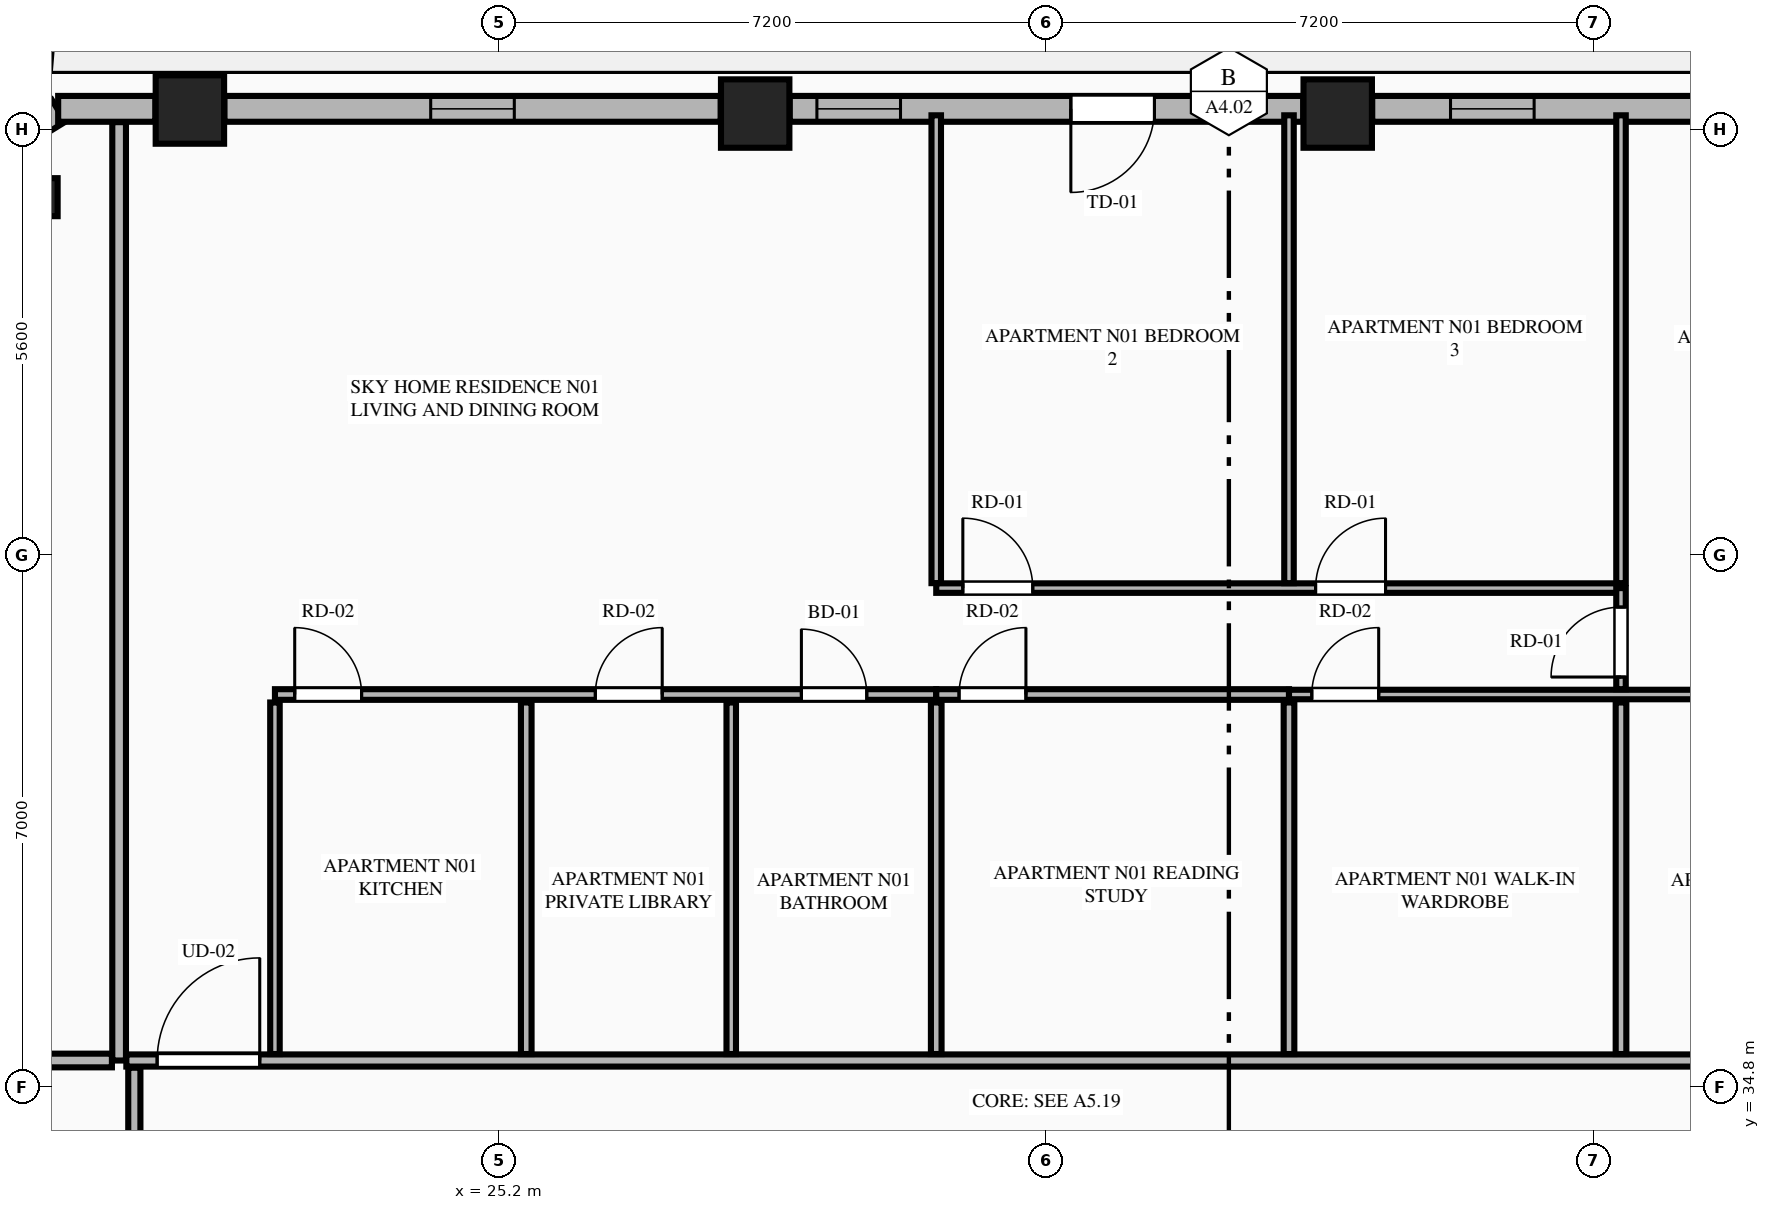
"""IFC4 building model, lengths in metres.
Left out: names, types, materials, properties, quantities, classifications, styles, units other than length and angle.
Written with IfcOpenShell. Run it as: python <this file> out.ifc"""

import sys

from ifc_helpers import new_model, si_unit, direction, frame, frame_2d, origin, origin_2d, place, context, subcontext, project, spatial, rectangle, extrude, element, fill, save


model = new_model("IFC4")
c1 = context("Model", 3, precision=1e-05, world=origin(), true_north=direction((0.0, 1.0)))
c2 = subcontext(c1, "Body", "Model", "MODEL_VIEW")
j1 = project(units=[si_unit("LENGTHUNIT", "METRE"), si_unit("PLANEANGLEUNIT", "RADIAN")], contexts=[c1])
p1 = place(None, origin())
s1 = spatial("IfcSite", under=j1, at=p1, CompositionType="ELEMENT")
p2 = place(p1, origin())
s2 = spatial("IfcBuilding", under=s1, at=p2, CompositionType="ELEMENT")
p3 = place(p2, frame((0.0, 0.0, 153.5)))
s3 = spatial("IfcBuildingStorey", under=s2, at=p3, CompositionType="ELEMENT", Elevation=153.5)
for number, where, z_axis, x_axis in (
    (1, (36.232, 47.608, 0.0), (0.0, 0.0, 1.0), (1.0, 0.0, 0.0)),
    (2, (28.568, 47.608, 0.0), (0.0, 0.0, 1.0), (1.0, 0.0, 0.0)),
    (3, (21.131, 47.661, 0.0), (0.0, 0.0, 1.0), (1.0, 0.0, 0.0)),
):
    element("IfcColumn", number, at=place(p3, frame(where, z_axis=z_axis, x_axis=x_axis)), inside=s3, PredefinedType="COLUMN", context=c2, shape_type="SweptSolid", body=[
        extrude(rectangle(XDim=0.9, YDim=0.9, at=origin_2d()), origin(), (0.0, 0.0, 1.0), 3.55),
    ])
p4 = place(p3, frame((19.141, 46.508, 0.0), z_axis=(0.0, 0.0, 1.0), x_axis=(-0.865160173452, -0.501495637342, 0.0)))
e4 = element("IfcColumn", 4, at=p4, inside=s3, PredefinedType="PILASTER", context=c2, shape_type="SweptSolid", body=[
    extrude(rectangle(XDim=0.5, YDim=0.35, at=origin_2d()), origin(), (0.0, 0.0, 1.0), 3.55),
])
p5 = place(p3, frame((19.403, 47.645, 0.0), z_axis=(0.0, 0.0, 1.0), x_axis=(-0.851798915137, -0.523868884523, 0.0)))
e5 = element("IfcWall", 5, at=p5, inside=s3, PredefinedType="STANDARD", context=c2, shape_type="SweptSolid", body=[
    extrude(rectangle(XDim=1.848, YDim=0.34, at=frame_2d((0.924, 0.0))), origin(), (0.0, 0.0, 1.0), 3.34),
])
p6 = place(p3, frame((43.215, 47.67, 0.0), z_axis=(0.0, 0.0, 1.0), x_axis=(-1.0, 0.0, 0.0)))
e6 = element("IfcWall", 6, at=p6, inside=s3, PredefinedType="STANDARD", context=c2, shape_type="SweptSolid", body=[
    extrude(rectangle(XDim=6.529, YDim=0.34, at=frame_2d((3.265, 0.0))), origin(), (0.0, 0.0, 1.0), 2.797),
])
p7 = place(p6, frame((1.022, 0.0, 0.75)))
e7 = element("IfcOpeningElement", 7, at=p7, cuts=e6, PredefinedType="OPENING", context=c2, shape_type="SweptSolid", body=[
    extrude(rectangle(XDim=1.1, YDim=1.897, at=frame_2d((0.55, 0.948))), frame((0.0, 0.18, 0.0), z_axis=(0.0, -1.0, 0.0), x_axis=(1.0, 0.0, 0.0)), (0.0, 0.0, 1.0), 0.36),
])
p8 = place(p6, frame((4.399, 0.0, 0.75)))
e8 = element("IfcOpeningElement", 8, at=p8, cuts=e6, PredefinedType="OPENING", context=c2, shape_type="SweptSolid", body=[
    extrude(rectangle(XDim=1.1, YDim=1.897, at=frame_2d((0.55, 0.948))), frame((0.0, 0.18, 0.0), z_axis=(0.0, -1.0, 0.0), x_axis=(1.0, 0.0, 0.0)), (0.0, 0.0, 1.0), 0.36),
])
p9 = place(p3, frame((35.778, 47.67, 0.0), z_axis=(0.0, 0.0, 1.0), x_axis=(-1.0, 0.0, 0.0)))
e9 = element("IfcWall", 9, at=p9, inside=s3, PredefinedType="STANDARD", context=c2, shape_type="SweptSolid", body=[
    extrude(rectangle(XDim=6.756, YDim=0.34, at=frame_2d((3.378, 0.0))), origin(), (0.0, 0.0, 1.0), 2.797),
])
p10 = place(p9, frame((1.957, 0.0, 0.0)))
e10 = element("IfcOpeningElement", 10, at=p10, cuts=e9, PredefinedType="OPENING", context=c2, shape_type="SweptSolid", body=[
    extrude(rectangle(XDim=1.1, YDim=2.25, at=frame_2d((0.55, 1.125))), frame((0.0, 0.18, 0.0), z_axis=(0.0, -1.0, 0.0), x_axis=(1.0, 0.0, 0.0)), (0.0, 0.0, 1.0), 0.36),
])
p11 = place(p9, frame((5.298, 0.0, 0.75)))
e11 = element("IfcOpeningElement", 11, at=p11, cuts=e9, PredefinedType="OPENING", context=c2, shape_type="SweptSolid", body=[
    extrude(rectangle(XDim=1.1, YDim=1.897, at=frame_2d((0.55, 0.948))), frame((0.0, 0.18, 0.0), z_axis=(0.0, -1.0, 0.0), x_axis=(1.0, 0.0, 0.0)), (0.0, 0.0, 1.0), 0.36),
])
p12 = place(p3, frame((28.114, 47.67, 0.0), z_axis=(0.0, 0.0, 1.0), x_axis=(-1.0, 0.0, 0.0)))
e12 = element("IfcWall", 12, at=p12, inside=s3, PredefinedType="STANDARD", context=c2, shape_type="SweptSolid", body=[
    extrude(rectangle(XDim=6.529, YDim=0.34, at=frame_2d((3.265, 0.0))), origin(), (0.0, 0.0, 1.0), 2.797),
])
p13 = place(p12, frame((2.715, 0.0, 0.75)))
e13 = element("IfcOpeningElement", 13, at=p13, cuts=e12, PredefinedType="OPENING", context=c2, shape_type="SweptSolid", body=[
    extrude(rectangle(XDim=1.1, YDim=1.897, at=frame_2d((0.55, 0.948))), frame((0.0, 0.18, 0.0), z_axis=(0.0, -1.0, 0.0), x_axis=(1.0, 0.0, 0.0)), (0.0, 0.0, 1.0), 0.36),
])
p14 = place(p3, frame((20.677, 47.67, 0.0), z_axis=(0.0, 0.0, 1.0), x_axis=(-1.0, 0.0, 0.0)))
e14 = element("IfcWall", 14, at=p14, inside=s3, PredefinedType="STANDARD", context=c2, shape_type="SweptSolid", body=[
    extrude(rectangle(XDim=1.279, YDim=0.34, at=frame_2d((0.64, 0.0))), origin(), (0.0, 0.0, 1.0), 3.34),
])
p15 = place(p3, frame((20.2, 35.15, 0.0), z_axis=(0.0, 0.0, 1.0), x_axis=(0.0, 1.0, 0.0)))
e15 = element("IfcWall", 15, at=p15, inside=s3, PredefinedType="PARTITIONING", context=c2, shape_type="SweptSolid", body=[
    extrude(rectangle(XDim=12.345, YDim=0.18, at=frame_2d((6.173, 0.0))), origin(), (0.0, 0.0, 1.0), 3.34),
])
p16 = place(p3, frame((20.295, 35.15, 0.0), z_axis=(0.0, 0.0, 1.0), x_axis=(1.0, 0.0, 0.0)))
e16 = element("IfcWall", 16, at=p16, inside=s3, PredefinedType="PARTITIONING", context=c2, shape_type="SweptSolid", body=[
    extrude(rectangle(XDim=24.21, YDim=0.16, at=frame_2d((12.105, 0.0))), origin(), (0.0, 0.0, 1.0), 3.34),
])
p17 = place(p16, frame((0.405, 0.0, 0.0)))
e17 = element("IfcOpeningElement", 17, at=p17, cuts=e16, PredefinedType="OPENING", context=c2, shape_type="SweptSolid", body=[
    extrude(rectangle(XDim=1.35, YDim=2.35, at=frame_2d((0.675, 1.175))), frame((0.0, 0.09, 0.0), z_axis=(0.0, -1.0, 0.0), x_axis=(1.0, 0.0, 0.0)), (0.0, 0.0, 1.0), 0.18),
])
p18 = place(p3, frame((22.25, 35.235, 0.0), z_axis=(0.0, 0.0, 1.0), x_axis=(0.0, 1.0, 0.0)))
e18 = element("IfcWall", 18, at=p18, inside=s3, PredefinedType="PARTITIONING", context=c2, shape_type="SweptSolid", body=[
    extrude(rectangle(XDim=4.625, YDim=0.125, at=frame_2d((2.312, 0.0))), origin(), (0.0, 0.0, 1.0), 2.722),
])
p19 = place(p3, frame((22.25, 39.965, 0.0), z_axis=(0.0, 0.0, 1.0), x_axis=(1.0, 0.0, 0.0)))
e19 = element("IfcWall", 19, at=p19, inside=s3, PredefinedType="PLUMBINGWALL", context=c2, shape_type="SweptSolid", body=[
    extrude(rectangle(XDim=8.7, YDim=0.14, at=frame_2d((4.35, 0.0))), origin(), (0.0, 0.0, 1.0), 3.34),
])
p20 = place(p19, frame((6.926, 0.0, 0.0)))
e20 = element("IfcOpeningElement", 20, at=p20, cuts=e19, PredefinedType="OPENING", context=c2, shape_type="SweptSolid", body=[
    extrude(rectangle(XDim=0.86, YDim=2.1, at=frame_2d((0.43, 1.05))), frame((0.0, 0.08, 0.0), z_axis=(0.0, -1.0, 0.0), x_axis=(1.0, 0.0, 0.0)), (0.0, 0.0, 1.0), 0.16),
])
p21 = place(p19, frame((0.26, 0.0, 0.0)))
e21 = element("IfcOpeningElement", 21, at=p21, cuts=e19, PredefinedType="OPENING", context=c2, shape_type="SweptSolid", body=[
    extrude(rectangle(XDim=0.88, YDim=2.15, at=frame_2d((0.44, 1.075))), frame((0.0, 0.08, 0.0), z_axis=(0.0, -1.0, 0.0), x_axis=(1.0, 0.0, 0.0)), (0.0, 0.0, 1.0), 0.16),
])
p22 = place(p19, frame((4.215, 0.0, 0.0)))
e22 = element("IfcOpeningElement", 22, at=p22, cuts=e19, PredefinedType="OPENING", context=c2, shape_type="SweptSolid", body=[
    extrude(rectangle(XDim=0.88, YDim=2.15, at=frame_2d((0.44, 1.075))), frame((0.0, 0.08, 0.0), z_axis=(0.0, -1.0, 0.0), x_axis=(1.0, 0.0, 0.0)), (0.0, 0.0, 1.0), 0.16),
])
p23 = place(p3, frame((30.95, 39.965, 0.0), z_axis=(0.0, 0.0, 1.0), x_axis=(1.0, 0.0, 0.0)))
e23 = element("IfcWall", 23, at=p23, inside=s3, PredefinedType="PLUMBINGWALL", context=c2, shape_type="SweptSolid", body=[
    extrude(rectangle(XDim=4.641, YDim=0.14, at=frame_2d((2.321, 0.0))), origin(), (0.0, 0.0, 1.0), 3.34),
])
p24 = place(p23, frame((0.3, 0.0, 0.0)))
e24 = element("IfcOpeningElement", 24, at=p24, cuts=e23, PredefinedType="OPENING", context=c2, shape_type="SweptSolid", body=[
    extrude(rectangle(XDim=0.88, YDim=2.15, at=frame_2d((0.44, 1.075))), frame((0.0, 0.08, 0.0), z_axis=(0.0, -1.0, 0.0), x_axis=(1.0, 0.0, 0.0)), (0.0, 0.0, 1.0), 0.16),
])
p25 = place(p3, frame((35.591, 39.965, 0.0), z_axis=(0.0, 0.0, 1.0), x_axis=(1.0, 0.0, 0.0)))
e25 = element("IfcWall", 25, at=p25, inside=s3, PredefinedType="PARTITIONING", context=c2, shape_type="SweptSolid", body=[
    extrude(rectangle(XDim=8.914, YDim=0.125, at=frame_2d((4.457, 0.0))), origin(), (0.0, 0.0, 1.0), 3.34),
])
p26 = place(p25, frame((6.216, 0.0, 0.0)))
e26 = element("IfcOpeningElement", 26, at=p26, cuts=e25, PredefinedType="OPENING", context=c2, shape_type="SweptSolid", body=[
    extrude(rectangle(XDim=0.86, YDim=2.1, at=frame_2d((0.43, 1.05))), frame((0.0, 0.073, 0.0), z_axis=(0.0, -1.0, 0.0), x_axis=(1.0, 0.0, 0.0)), (0.0, 0.0, 1.0), 0.145),
])
p27 = place(p25, frame((0.3, 0.0, 0.0)))
e27 = element("IfcOpeningElement", 27, at=p27, cuts=e25, PredefinedType="OPENING", context=c2, shape_type="SweptSolid", body=[
    extrude(rectangle(XDim=0.88, YDim=2.15, at=frame_2d((0.44, 1.075))), frame((0.0, 0.073, 0.0), z_axis=(0.0, -1.0, 0.0), x_axis=(1.0, 0.0, 0.0)), (0.0, 0.0, 1.0), 0.145),
])
p28 = place(p3, frame((25.556, 35.235, 0.0), z_axis=(0.0, 0.0, 1.0), x_axis=(0.0, 1.0, 0.0)))
e28 = element("IfcWall", 28, at=p28, inside=s3, PredefinedType="PLUMBINGWALL", context=c2, shape_type="SweptSolid", body=[
    extrude(rectangle(XDim=4.625, YDim=0.14, at=frame_2d((2.312, 0.0))), origin(), (0.0, 0.0, 1.0), 3.34),
])
p29 = place(p3, frame((28.253, 35.235, 0.0), z_axis=(0.0, 0.0, 1.0), x_axis=(0.0, 1.0, 0.0)))
e29 = element("IfcWall", 29, at=p29, inside=s3, PredefinedType="PARTITIONING", context=c2, shape_type="SweptSolid", body=[
    extrude(rectangle(XDim=4.625, YDim=0.125, at=frame_2d((2.312, 0.0))), origin(), (0.0, 0.0, 1.0), 3.34),
])
p30 = place(p3, frame((30.95, 41.43, 0.0), z_axis=(0.0, 0.0, 1.0), x_axis=(0.0, 1.0, 0.0)))
e30 = element("IfcWall", 30, at=p30, inside=s3, PredefinedType="PARTITIONING", context=c2, shape_type="SweptSolid", body=[
    extrude(rectangle(XDim=6.155, YDim=0.125, at=frame_2d((3.078, 0.0))), origin(), (0.0, 0.0, 1.0), 3.34),
])
p31 = place(p3, frame((30.95, 41.365, 0.0), z_axis=(0.0, 0.0, 1.0), x_axis=(1.0, 0.0, 0.0)))
e31 = element("IfcWall", 31, at=p31, inside=s3, PredefinedType="PARTITIONING", context=c2, shape_type="SweptSolid", body=[
    extrude(rectangle(XDim=9.009, YDim=0.125, at=frame_2d((4.504, 0.0))), origin(), (0.0, 0.0, 1.0), 3.34),
])
p32 = place(p31, frame((0.35, 0.0, 0.0)))
e32 = element("IfcOpeningElement", 32, at=p32, cuts=e31, PredefinedType="OPENING", context=c2, shape_type="SweptSolid", body=[
    extrude(rectangle(XDim=0.92, YDim=2.15, at=frame_2d((0.46, 1.075))), frame((0.0, 0.073, 0.0), z_axis=(0.0, -1.0, 0.0), x_axis=(1.0, 0.0, 0.0)), (0.0, 0.0, 1.0), 0.145),
])
p33 = place(p31, frame((4.991, 0.0, 0.0)))
e33 = element("IfcOpeningElement", 33, at=p33, cuts=e31, PredefinedType="OPENING", context=c2, shape_type="SweptSolid", body=[
    extrude(rectangle(XDim=0.92, YDim=2.15, at=frame_2d((0.46, 1.075))), frame((0.0, 0.073, 0.0), z_axis=(0.0, -1.0, 0.0), x_axis=(1.0, 0.0, 0.0)), (0.0, 0.0, 1.0), 0.145),
])
p34 = place(p3, frame((39.959, 40.035, 0.0), z_axis=(0.0, 0.0, 1.0), x_axis=(0.0, 1.0, 0.0)))
e34 = element("IfcWall", 34, at=p34, inside=s3, PredefinedType="PARTITIONING", context=c2, shape_type="SweptSolid", body=[
    extrude(rectangle(XDim=1.33, YDim=0.125, at=frame_2d((0.665, 0.0))), origin(), (0.0, 0.0, 1.0), 3.34),
])
p35 = place(p34, frame((0.16, 0.0, 0.0)))
e35 = element("IfcOpeningElement", 35, at=p35, cuts=e34, PredefinedType="OPENING", context=c2, shape_type="SweptSolid", body=[
    extrude(rectangle(XDim=0.92, YDim=2.15, at=frame_2d((0.46, 1.075))), frame((0.0, 0.073, 0.0), z_axis=(0.0, -1.0, 0.0), x_axis=(1.0, 0.0, 0.0)), (0.0, 0.0, 1.0), 0.145),
])
for number, where, z_axis, x_axis in (
    (36, (30.95, 35.235, 0.0), (0.0, 0.0, 1.0), (0.0, 1.0, 0.0)),
    (37, (35.591, 35.235, 0.0), (0.0, 0.0, 1.0), (0.0, 1.0, 0.0)),
):
    element("IfcWall", number, at=place(p3, frame(where, z_axis=z_axis, x_axis=x_axis)), inside=s3, PredefinedType="PLUMBINGWALL", context=c2, shape_type="SweptSolid", body=[
        extrude(rectangle(XDim=4.625, YDim=0.14, at=frame_2d((2.312, 0.0))), origin(), (0.0, 0.0, 1.0), 3.34),
    ])
for number, where, z_axis, x_axis in (
    (38, (35.591, 41.43, 0.0), (0.0, 0.0, 1.0), (0.0, 1.0, 0.0)),
    (39, (39.959, 41.43, 0.0), (0.0, 0.0, 1.0), (0.0, 1.0, 0.0)),
):
    element("IfcWall", number, at=place(p3, frame(where, z_axis=z_axis, x_axis=x_axis)), inside=s3, PredefinedType="PARTITIONING", context=c2, shape_type="SweptSolid", body=[
        extrude(rectangle(XDim=6.155, YDim=0.125, at=frame_2d((3.078, 0.0))), origin(), (0.0, 0.0, 1.0), 3.34),
    ])
p36 = place(p3, frame((39.959, 35.235, 0.0), z_axis=(0.0, 0.0, 1.0), x_axis=(0.0, 1.0, 0.0)))
e40 = element("IfcWall", 40, at=p36, inside=s3, PredefinedType="PLUMBINGWALL", context=c2, shape_type="SweptSolid", body=[
    extrude(rectangle(XDim=4.625, YDim=0.14, at=frame_2d((2.312, 0.0))), origin(), (0.0, 0.0, 1.0), 3.34),
])
p37 = place(p3, frame((12.21, 35.15, 0.0), z_axis=(0.0, 0.0, 1.0), x_axis=(1.0, 0.0, 0.0)))
e41 = element("IfcWall", 41, at=p37, inside=s3, PredefinedType="PARTITIONING", context=c2, shape_type="SweptSolid", body=[
    extrude(rectangle(XDim=7.895, YDim=0.18, at=frame_2d((3.948, 0.0))), origin(), (0.0, 0.0, 1.0), 3.34),
])
p38 = place(p3, frame((20.4, 16.745, 0.0), z_axis=(0.0, 0.0, 1.0), x_axis=(0.0, 1.0, 0.0)))
e42 = element("IfcWall", 42, at=p38, inside=s3, PredefinedType="PARTITIONING", context=c2, shape_type="SweptSolid", body=[
    extrude(rectangle(XDim=18.31, YDim=0.16, at=frame_2d((9.155, 0.0))), origin(), (0.0, 0.0, 1.0), 3.34),
])
p39 = place(p38, frame((0.45, 0.0, 0.0)))
e43 = element("IfcOpeningElement", 43, at=p39, cuts=e42, PredefinedType="OPENING", context=c2, shape_type="SweptSolid", body=[
    extrude(rectangle(XDim=1.02, YDim=2.25, at=frame_2d((0.51, 1.125))), frame((0.0, 0.09, 0.0), z_axis=(0.0, -1.0, 0.0), x_axis=(1.0, 0.0, 0.0)), (0.0, 0.0, 1.0), 0.18),
])
p40 = place(p10, origin())
e44 = element("IfcDoor", 44, at=p40, inside=s3, OperationType="SINGLE_SWING_RIGHT", PredefinedType="DOOR", context=c2, shape_type="SweptSolid", body=[
    extrude(rectangle(XDim=1.1, YDim=2.25, at=frame_2d((0.55, 1.125))), frame((0.0, 0.025, 0.0), z_axis=(0.0, -1.0, 0.0), x_axis=(1.0, 0.0, 0.0)), (0.0, 0.0, 1.0), 0.05),
])
fill(e10, e44)
p41 = place(p13, origin())
e45 = element("IfcWindow", 45, at=p41, inside=s3, PartitioningType="SINGLE_PANEL", PredefinedType="WINDOW", context=c2, shape_type="SweptSolid", body=[
    extrude(rectangle(XDim=1.1, YDim=1.897, at=frame_2d((0.55, 0.948))), frame((0.0, 0.03, 0.0), z_axis=(0.0, -1.0, 0.0), x_axis=(1.0, 0.0, 0.0)), (0.0, 0.0, 1.0), 0.06),
])
fill(e13, e45)
p42 = place(p20, origin())
e46 = element("IfcDoor", 46, at=p42, inside=s3, OperationType="SINGLE_SWING_LEFT", PredefinedType="DOOR", context=c2, shape_type="SweptSolid", body=[
    extrude(rectangle(XDim=0.86, YDim=2.1, at=frame_2d((0.43, 1.05))), frame((0.0, 0.025, 0.0), z_axis=(0.0, -1.0, 0.0), x_axis=(1.0, 0.0, 0.0)), (0.0, 0.0, 1.0), 0.05),
])
fill(e20, e46)
p43 = place(p17, origin())
e47 = element("IfcDoor", 47, at=p43, inside=s3, OperationType="SINGLE_SWING_RIGHT", PredefinedType="DOOR", context=c2, shape_type="SweptSolid", body=[
    extrude(rectangle(XDim=1.35, YDim=2.35, at=frame_2d((0.675, 1.175))), frame((0.0, 0.025, 0.0), z_axis=(0.0, -1.0, 0.0), x_axis=(1.0, 0.0, 0.0)), (0.0, 0.0, 1.0), 0.05),
])
fill(e17, e47)
p44 = place(p21, origin())
e48 = element("IfcDoor", 48, at=p44, inside=s3, OperationType="SINGLE_SWING_LEFT", PredefinedType="DOOR", context=c2, shape_type="SweptSolid", body=[
    extrude(rectangle(XDim=0.88, YDim=2.15, at=frame_2d((0.44, 1.075))), frame((0.0, 0.025, 0.0), z_axis=(0.0, -1.0, 0.0), x_axis=(1.0, 0.0, 0.0)), (0.0, 0.0, 1.0), 0.05),
])
fill(e21, e48)
p45 = place(p22, origin())
e49 = element("IfcDoor", 49, at=p45, inside=s3, OperationType="SINGLE_SWING_RIGHT", PredefinedType="DOOR", context=c2, shape_type="SweptSolid", body=[
    extrude(rectangle(XDim=0.88, YDim=2.15, at=frame_2d((0.44, 1.075))), frame((0.0, 0.025, 0.0), z_axis=(0.0, -1.0, 0.0), x_axis=(1.0, 0.0, 0.0)), (0.0, 0.0, 1.0), 0.05),
])
fill(e22, e49)
p46 = place(p24, origin())
e50 = element("IfcDoor", 50, at=p46, inside=s3, OperationType="SINGLE_SWING_RIGHT", PredefinedType="DOOR", context=c2, shape_type="SweptSolid", body=[
    extrude(rectangle(XDim=0.88, YDim=2.15, at=frame_2d((0.44, 1.075))), frame((0.0, 0.025, 0.0), z_axis=(0.0, -1.0, 0.0), x_axis=(1.0, 0.0, 0.0)), (0.0, 0.0, 1.0), 0.05),
])
fill(e24, e50)
p47 = place(p32, origin())
e51 = element("IfcDoor", 51, at=p47, inside=s3, OperationType="SINGLE_SWING_LEFT", PredefinedType="DOOR", context=c2, shape_type="SweptSolid", body=[
    extrude(rectangle(XDim=0.92, YDim=2.15, at=frame_2d((0.46, 1.075))), frame((0.0, 0.025, 0.0), z_axis=(0.0, -1.0, 0.0), x_axis=(1.0, 0.0, 0.0)), (0.0, 0.0, 1.0), 0.05),
])
fill(e32, e51)
p48 = place(p33, origin())
e52 = element("IfcDoor", 52, at=p48, inside=s3, OperationType="SINGLE_SWING_RIGHT", PredefinedType="DOOR", context=c2, shape_type="SweptSolid", body=[
    extrude(rectangle(XDim=0.92, YDim=2.15, at=frame_2d((0.46, 1.075))), frame((0.0, 0.025, 0.0), z_axis=(0.0, -1.0, 0.0), x_axis=(1.0, 0.0, 0.0)), (0.0, 0.0, 1.0), 0.05),
])
fill(e33, e52)
p49 = place(p35, origin())
e53 = element("IfcDoor", 53, at=p49, inside=s3, OperationType="SINGLE_SWING_LEFT", PredefinedType="DOOR", context=c2, shape_type="SweptSolid", body=[
    extrude(rectangle(XDim=0.92, YDim=2.15, at=frame_2d((0.46, 1.075))), frame((0.0, 0.025, 0.0), z_axis=(0.0, -1.0, 0.0), x_axis=(1.0, 0.0, 0.0)), (0.0, 0.0, 1.0), 0.05),
])
fill(e35, e53)
p50 = place(p27, origin())
e54 = element("IfcDoor", 54, at=p50, inside=s3, OperationType="SINGLE_SWING_RIGHT", PredefinedType="DOOR", context=c2, shape_type="SweptSolid", body=[
    extrude(rectangle(XDim=0.88, YDim=2.15, at=frame_2d((0.44, 1.075))), frame((0.0, 0.025, 0.0), z_axis=(0.0, -1.0, 0.0), x_axis=(1.0, 0.0, 0.0)), (0.0, 0.0, 1.0), 0.05),
])
fill(e27, e54)
p51 = place(p8, origin())
e55 = element("IfcWindow", 55, at=p51, inside=s3, PartitioningType="SINGLE_PANEL", PredefinedType="WINDOW", context=c2, shape_type="SweptSolid", body=[
    extrude(rectangle(XDim=1.1, YDim=1.897, at=frame_2d((0.55, 0.948))), frame((0.0, 0.03, 0.0), z_axis=(0.0, -1.0, 0.0), x_axis=(1.0, 0.0, 0.0)), (0.0, 0.0, 1.0), 0.06),
])
fill(e8, e55)
p52 = place(p11, origin())
e56 = element("IfcWindow", 56, at=p52, inside=s3, PartitioningType="SINGLE_PANEL", PredefinedType="WINDOW", context=c2, shape_type="SweptSolid", body=[
    extrude(rectangle(XDim=1.1, YDim=1.897, at=frame_2d((0.55, 0.948))), frame((0.0, 0.03, 0.0), z_axis=(0.0, -1.0, 0.0), x_axis=(1.0, 0.0, 0.0)), (0.0, 0.0, 1.0), 0.06),
])
fill(e11, e56)
save(model, sys.argv[1])
